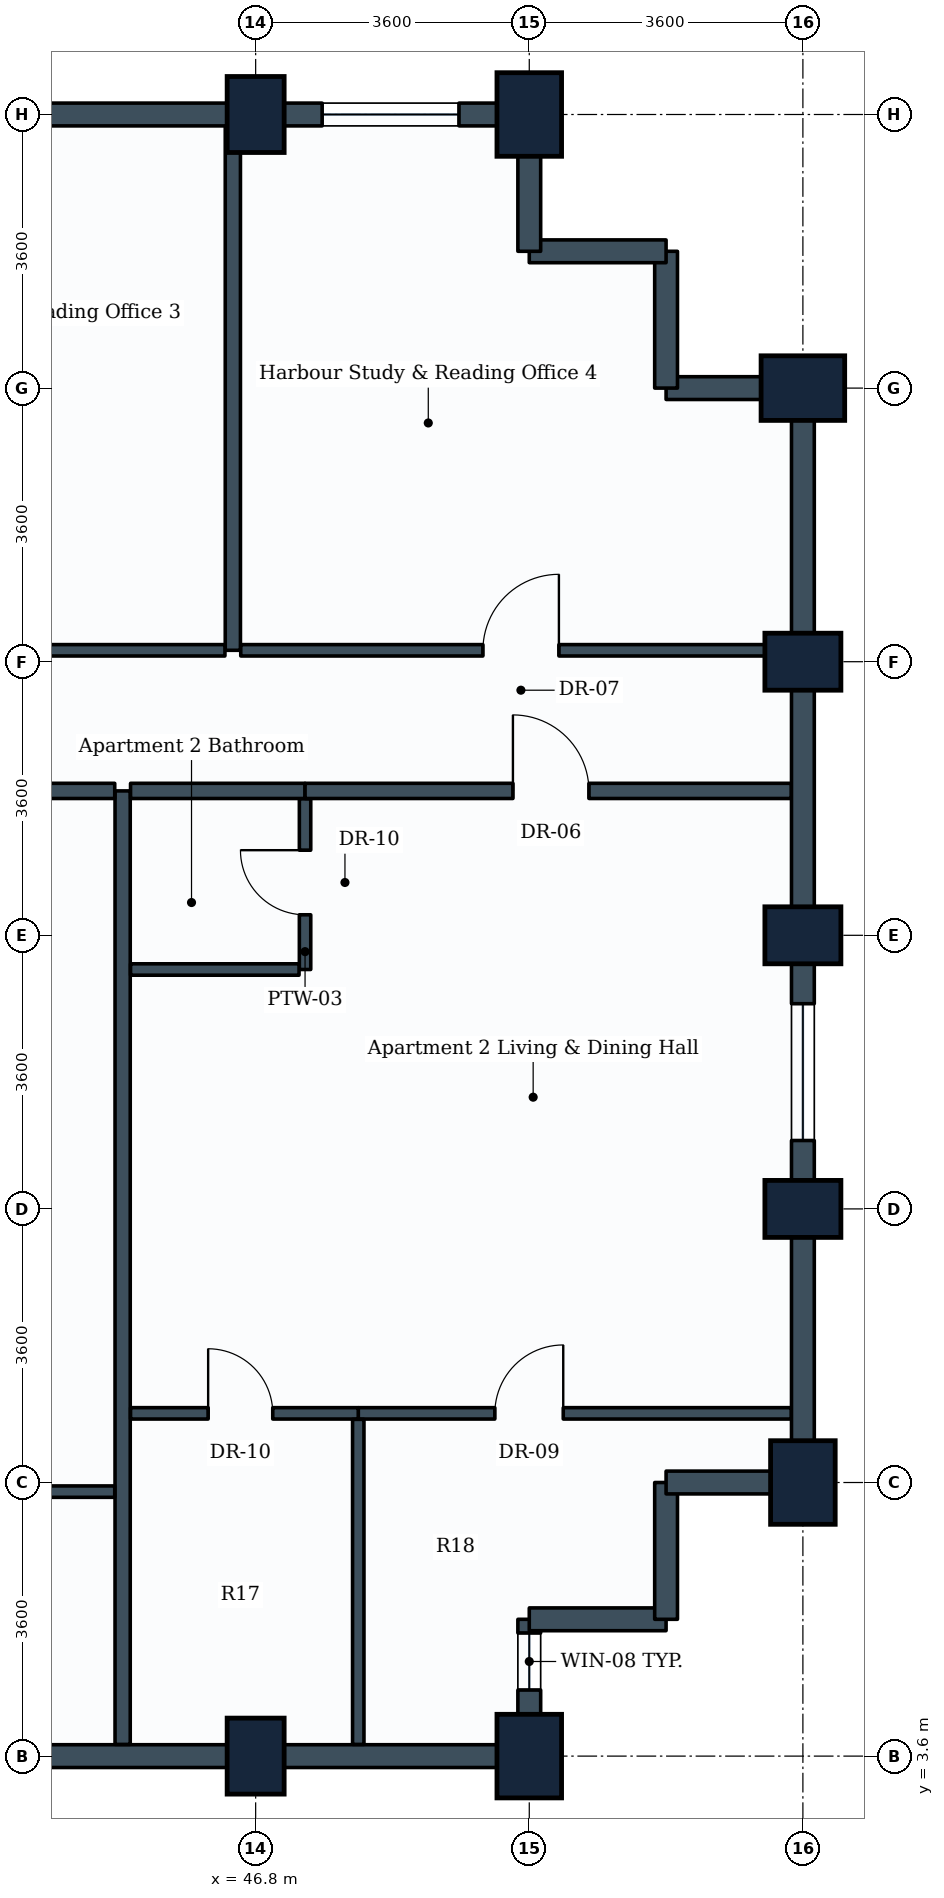
"""IFC4 building model, lengths in metres.
Left out: names, types, materials, properties, quantities, classifications, styles, units other than length and angle.
Written with IfcOpenShell. Run it as: python <this file> out.ifc"""

import sys

from ifc_helpers import new_model, si_unit, direction, frame, frame_2d, origin, origin_2d, place, context, subcontext, project, spatial, rectangle, extrude, element, fill, save


model = new_model("IFC4")
c1 = context("Model", 3, precision=1e-05, world=origin(), true_north=direction((0.0, 1.0)))
c2 = subcontext(c1, "Body", "Model", "MODEL_VIEW")
j1 = project(units=[si_unit("LENGTHUNIT", "METRE"), si_unit("PLANEANGLEUNIT", "RADIAN")], contexts=[c1])
p1 = place(None, origin())
s1 = spatial("IfcSite", under=j1, at=p1, CompositionType="ELEMENT")
p2 = place(p1, origin())
s2 = spatial("IfcBuilding", under=s1, at=p2, CompositionType="ELEMENT")
p3 = place(p2, frame((0.0, 0.0, 158.0)))
s3 = spatial("IfcBuildingStorey", under=s2, at=p3, CompositionType="ELEMENT", Elevation=158.0)
for number, where, z_axis, x_axis in (
    (1, (46.8, 3.6, 0.0), (0.0, 0.0, 1.0), (1.0, 0.0, 0.0)),
    (2, (46.8, 25.2, 0.0), (0.0, 0.0, 1.0), (1.0, 0.0, 0.0)),
):
    element("IfcColumn", number, at=place(p3, frame(where, z_axis=z_axis, x_axis=x_axis)), inside=s3, PredefinedType="COLUMN", context=c2, shape_type="SweptSolid", body=[
        extrude(rectangle(XDim=0.75, YDim=1.0, at=origin_2d()), origin(), (0.0, 0.0, 1.0), 3.8),
    ])
for number, where, z_axis, x_axis in (
    (3, (50.4, 3.6, 0.0), (0.0, 0.0, 1.0), (1.0, 0.0, 0.0)),
    (4, (50.4, 25.2, 0.0), (0.0, 0.0, 1.0), (1.0, 0.0, 0.0)),
    (5, (54.0, 7.2, 0.0), (0.0, 0.0, 1.0), (1.0, 0.0, 0.0)),
):
    element("IfcColumn", number, at=place(p3, frame(where, z_axis=z_axis, x_axis=x_axis)), inside=s3, PredefinedType="COLUMN", context=c2, shape_type="SweptSolid", body=[
        extrude(rectangle(XDim=0.85, YDim=1.1, at=origin_2d()), origin(), (0.0, 0.0, 1.0), 3.8),
    ])
for number, where, z_axis, x_axis in (
    (6, (54.0, 10.8, 0.0), (0.0, 0.0, 1.0), (0.0, 1.0, 0.0)),
    (7, (54.0, 14.4, 0.0), (0.0, 0.0, 1.0), (0.0, 1.0, 0.0)),
    (8, (54.0, 18.0, 0.0), (0.0, 0.0, 1.0), (0.0, 1.0, 0.0)),
):
    element("IfcColumn", number, at=place(p3, frame(where, z_axis=z_axis, x_axis=x_axis)), inside=s3, PredefinedType="COLUMN", context=c2, shape_type="SweptSolid", body=[
        extrude(rectangle(XDim=0.75, YDim=1.0, at=origin_2d()), origin(), (0.0, 0.0, 1.0), 3.8),
    ])
p4 = place(p3, frame((54.0, 21.6, 0.0), z_axis=(0.0, 0.0, 1.0), x_axis=(0.0, 1.0, 0.0)))
e9 = element("IfcColumn", 9, at=p4, inside=s3, PredefinedType="COLUMN", context=c2, shape_type="SweptSolid", body=[
    extrude(rectangle(XDim=0.85, YDim=1.1, at=origin_2d()), origin(), (0.0, 0.0, 1.0), 3.8),
])
p5 = place(p3, frame((46.8, 3.6, 0.0), z_axis=(0.0, 0.0, 1.0), x_axis=(-1.0, 0.0, 0.0)))
e10 = element("IfcWall", 10, at=p5, inside=s3, PredefinedType="STANDARD", context=c2, shape_type="SweptSolid", body=[
    extrude(rectangle(XDim=3.6, YDim=0.3, at=frame_2d((1.8, 0.0))), origin(), (0.0, 0.0, 1.0), 2.93),
])
p6 = place(p3, frame((50.4, 3.6, 0.0), z_axis=(0.0, 0.0, 1.0), x_axis=(-1.0, 0.0, 0.0)))
e11 = element("IfcWall", 11, at=p6, inside=s3, PredefinedType="STANDARD", context=c2, shape_type="SweptSolid", body=[
    extrude(rectangle(XDim=3.6, YDim=0.3, at=frame_2d((1.8, 0.0))), origin(), (0.0, 0.0, 1.0), 2.93),
])
p7 = place(p3, frame((50.4, 5.4, 0.0), z_axis=(0.0, 0.0, 1.0), x_axis=(0.0, -1.0, 0.0)))
e12 = element("IfcWall", 12, at=p7, inside=s3, PredefinedType="STANDARD", context=c2, shape_type="SweptSolid", body=[
    extrude(rectangle(XDim=1.8, YDim=0.3, at=frame_2d((0.9, 0.0))), origin(), (0.0, 0.0, 1.0), 2.93),
])
p8 = place(p7, frame((0.18, 0.0, 0.85)))
e13 = element("IfcOpeningElement", 13, at=p8, cuts=e12, PredefinedType="OPENING", context=c2, shape_type="SweptSolid", body=[
    extrude(rectangle(XDim=0.75, YDim=1.05, at=frame_2d((0.375, 0.525))), frame((0.0, 0.16, 0.0), z_axis=(0.0, -1.0, 0.0), x_axis=(1.0, 0.0, 0.0)), (0.0, 0.0, 1.0), 0.32),
])
for number, where, z_axis, x_axis in (
    (14, (52.2, 5.4, 0.0), (0.0, 0.0, 1.0), (-1.0, 0.0, 0.0)),
    (15, (52.2, 7.2, 0.0), (0.0, 0.0, 1.0), (0.0, -1.0, 0.0)),
):
    element("IfcWall", number, at=place(p3, frame(where, z_axis=z_axis, x_axis=x_axis)), inside=s3, PredefinedType="STANDARD", context=c2, shape_type="SweptSolid", body=[
        extrude(rectangle(XDim=1.8, YDim=0.3, at=frame_2d((0.9, 0.0))), origin(), (0.0, 0.0, 1.0), 3.535),
    ])
p9 = place(p3, frame((54.0, 7.2, 0.0), z_axis=(0.0, 0.0, 1.0), x_axis=(-1.0, 0.0, 0.0)))
e16 = element("IfcWall", 16, at=p9, inside=s3, PredefinedType="STANDARD", context=c2, shape_type="SweptSolid", body=[
    extrude(rectangle(XDim=1.8, YDim=0.3, at=frame_2d((0.9, 0.0))), origin(), (0.0, 0.0, 1.0), 2.93),
])
p10 = place(p3, frame((54.0, 10.8, 0.0), z_axis=(0.0, 0.0, 1.0), x_axis=(0.0, -1.0, 0.0)))
e17 = element("IfcWall", 17, at=p10, inside=s3, PredefinedType="STANDARD", context=c2, shape_type="SweptSolid", body=[
    extrude(rectangle(XDim=3.6, YDim=0.3, at=frame_2d((1.8, 0.0))), origin(), (0.0, 0.0, 1.0), 2.93),
])
p11 = place(p3, frame((54.0, 14.4, 0.0), z_axis=(0.0, 0.0, 1.0), x_axis=(0.0, -1.0, 0.0)))
e18 = element("IfcWall", 18, at=p11, inside=s3, PredefinedType="STANDARD", context=c2, shape_type="SweptSolid", body=[
    extrude(rectangle(XDim=3.6, YDim=0.3, at=frame_2d((1.8, 0.0))), origin(), (0.0, 0.0, 1.0), 2.93),
])
p12 = place(p11, frame((0.9, 0.0, 0.85)))
e19 = element("IfcOpeningElement", 19, at=p12, cuts=e18, PredefinedType="OPENING", context=c2, shape_type="SweptSolid", body=[
    extrude(rectangle(XDim=1.8, YDim=1.35, at=frame_2d((0.9, 0.675))), frame((0.0, 0.16, 0.0), z_axis=(0.0, -1.0, 0.0), x_axis=(1.0, 0.0, 0.0)), (0.0, 0.0, 1.0), 0.32),
])
for number, where, z_axis, x_axis in (
    (20, (54.0, 18.0, 0.0), (0.0, 0.0, 1.0), (0.0, -1.0, 0.0)),
    (21, (54.0, 21.6, 0.0), (0.0, 0.0, 1.0), (0.0, -1.0, 0.0)),
):
    element("IfcWall", number, at=place(p3, frame(where, z_axis=z_axis, x_axis=x_axis)), inside=s3, PredefinedType="STANDARD", context=c2, shape_type="SweptSolid", body=[
        extrude(rectangle(XDim=3.6, YDim=0.3, at=frame_2d((1.8, 0.0))), origin(), (0.0, 0.0, 1.0), 2.93),
    ])
p13 = place(p3, frame((52.2, 21.6, 0.0), z_axis=(0.0, 0.0, 1.0), x_axis=(1.0, 0.0, 0.0)))
e22 = element("IfcWall", 22, at=p13, inside=s3, PredefinedType="STANDARD", context=c2, shape_type="SweptSolid", body=[
    extrude(rectangle(XDim=1.8, YDim=0.3, at=frame_2d((0.9, 0.0))), origin(), (0.0, 0.0, 1.0), 2.93),
])
p14 = place(p3, frame((52.2, 23.4, 0.0), z_axis=(0.0, 0.0, 1.0), x_axis=(0.0, -1.0, 0.0)))
e23 = element("IfcWall", 23, at=p14, inside=s3, PredefinedType="STANDARD", context=c2, shape_type="SweptSolid", body=[
    extrude(rectangle(XDim=1.8, YDim=0.3, at=frame_2d((0.9, 0.0))), origin(), (0.0, 0.0, 1.0), 3.535),
])
p15 = place(p3, frame((50.4, 23.4, 0.0), z_axis=(0.0, 0.0, 1.0), x_axis=(1.0, 0.0, 0.0)))
e24 = element("IfcWall", 24, at=p15, inside=s3, PredefinedType="STANDARD", context=c2, shape_type="SweptSolid", body=[
    extrude(rectangle(XDim=1.8, YDim=0.3, at=frame_2d((0.9, 0.0))), origin(), (0.0, 0.0, 1.0), 3.535),
])
p16 = place(p3, frame((50.4, 25.2, 0.0), z_axis=(0.0, 0.0, 1.0), x_axis=(0.0, -1.0, 0.0)))
e25 = element("IfcWall", 25, at=p16, inside=s3, PredefinedType="STANDARD", context=c2, shape_type="SweptSolid", body=[
    extrude(rectangle(XDim=1.8, YDim=0.3, at=frame_2d((0.9, 0.0))), origin(), (0.0, 0.0, 1.0), 2.93),
])
p17 = place(p3, frame((46.8, 25.2, 0.0), z_axis=(0.0, 0.0, 1.0), x_axis=(1.0, 0.0, 0.0)))
e26 = element("IfcWall", 26, at=p17, inside=s3, PredefinedType="STANDARD", context=c2, shape_type="SweptSolid", body=[
    extrude(rectangle(XDim=3.6, YDim=0.3, at=frame_2d((1.8, 0.0))), origin(), (0.0, 0.0, 1.0), 2.93),
])
p18 = place(p17, frame((0.875, 0.0, 0.85)))
e27 = element("IfcOpeningElement", 27, at=p18, cuts=e26, PredefinedType="OPENING", context=c2, shape_type="SweptSolid", body=[
    extrude(rectangle(XDim=1.8, YDim=1.35, at=frame_2d((0.9, 0.675))), frame((0.0, 0.16, 0.0), z_axis=(0.0, -1.0, 0.0), x_axis=(1.0, 0.0, 0.0)), (0.0, 0.0, 1.0), 0.32),
])
p19 = place(p3, frame((43.2, 25.2, 0.0), z_axis=(0.0, 0.0, 1.0), x_axis=(1.0, 0.0, 0.0)))
e28 = element("IfcWall", 28, at=p19, inside=s3, PredefinedType="STANDARD", context=c2, shape_type="SweptSolid", body=[
    extrude(rectangle(XDim=3.6, YDim=0.3, at=frame_2d((1.8, 0.0))), origin(), (0.0, 0.0, 1.0), 2.93),
])
p20 = place(p3, frame((45.05, 3.754, 0.0), z_axis=(0.0, 0.0, 1.0), x_axis=(0.0, 1.0, 0.0)))
e29 = element("IfcWall", 29, at=p20, inside=s3, PredefinedType="PARTITIONING", context=c2, shape_type="SweptSolid", body=[
    extrude(rectangle(XDim=12.546, YDim=0.2, at=frame_2d((6.273, 0.0))), origin(), (0.0, 0.0, 1.0), 2.93),
])
p21 = place(p3, frame((36.8, 16.3, 0.0), z_axis=(0.0, 0.0, 1.0), x_axis=(1.0, 0.0, 0.0)))
e30 = element("IfcWall", 30, at=p21, inside=s3, PredefinedType="PARTITIONING", context=c2, shape_type="SweptSolid", body=[
    extrude(rectangle(XDim=8.146, YDim=0.2, at=frame_2d((4.073, 0.0))), origin(), (0.0, 0.0, 1.0), 3.17),
])
p22 = place(p21, frame((2.829, 0.0, 0.0)))
e31 = element("IfcOpeningElement", 31, at=p22, cuts=e30, PredefinedType="OPENING", context=c2, shape_type="SweptSolid", body=[
    extrude(rectangle(XDim=1.0, YDim=2.1, at=frame_2d((0.5, 1.05))), frame((0.0, 0.11, 0.0), z_axis=(0.0, -1.0, 0.0), x_axis=(1.0, 0.0, 0.0)), (0.0, 0.0, 1.0), 0.22),
])
p23 = place(p3, frame((37.5, 7.08, 0.0), z_axis=(0.0, 0.0, 1.0), x_axis=(1.0, 0.0, 0.0)))
e32 = element("IfcWall", 32, at=p23, inside=s3, PredefinedType="PARTITIONING", context=c2, shape_type="SweptSolid", body=[
    extrude(rectangle(XDim=7.446, YDim=0.15, at=frame_2d((3.723, 0.0))), origin(), (0.0, 0.0, 1.0), 3.17),
])
p24 = place(p23, frame((3.285, 0.0, 0.0)))
e33 = element("IfcOpeningElement", 33, at=p24, cuts=e32, PredefinedType="OPENING", context=c2, shape_type="SweptSolid", body=[
    extrude(rectangle(XDim=0.9, YDim=2.1, at=frame_2d((0.45, 1.05))), frame((0.0, 0.085, 0.0), z_axis=(0.0, -1.0, 0.0), x_axis=(1.0, 0.0, 0.0)), (0.0, 0.0, 1.0), 0.17),
])
p25 = place(p3, frame((45.154, 16.3, 0.0), z_axis=(0.0, 0.0, 1.0), x_axis=(1.0, 0.0, 0.0)))
e34 = element("IfcWall", 34, at=p25, inside=s3, PredefinedType="PARTITIONING", context=c2, shape_type="SweptSolid", body=[
    extrude(rectangle(XDim=2.296, YDim=0.2, at=frame_2d((1.148, 0.0))), origin(), (0.0, 0.0, 1.0), 3.17),
])
p26 = place(p3, frame((47.45, 13.95, 0.0), z_axis=(0.0, 0.0, 1.0), x_axis=(0.0, 1.0, 0.0)))
e35 = element("IfcWall", 35, at=p26, inside=s3, PredefinedType="PARTITIONING", context=c2, shape_type="SweptSolid", body=[
    extrude(rectangle(XDim=2.246, YDim=0.15, at=frame_2d((1.123, 0.0))), origin(), (0.0, 0.0, 1.0), 3.17),
])
p27 = place(p26, frame((0.72, 0.0, 0.0)))
e36 = element("IfcOpeningElement", 36, at=p27, cuts=e35, PredefinedType="OPENING", context=c2, shape_type="SweptSolid", body=[
    extrude(rectangle(XDim=0.85, YDim=2.1, at=frame_2d((0.425, 1.05))), frame((0.0, 0.085, 0.0), z_axis=(0.0, -1.0, 0.0), x_axis=(1.0, 0.0, 0.0)), (0.0, 0.0, 1.0), 0.17),
])
p28 = place(p3, frame((45.154, 13.95, 0.0), z_axis=(0.0, 0.0, 1.0), x_axis=(1.0, 0.0, 0.0)))
e37 = element("IfcWall", 37, at=p28, inside=s3, PredefinedType="PARTITIONING", context=c2, shape_type="SweptSolid", body=[
    extrude(rectangle(XDim=2.217, YDim=0.15, at=frame_2d((1.108, 0.0))), origin(), (0.0, 0.0, 1.0), 3.17),
])
p29 = place(p3, frame((47.45, 16.3, 0.0), z_axis=(0.0, 0.0, 1.0), x_axis=(1.0, 0.0, 0.0)))
e38 = element("IfcWall", 38, at=p29, inside=s3, PredefinedType="PARTITIONING", context=c2, shape_type="SweptSolid", body=[
    extrude(rectangle(XDim=6.396, YDim=0.2, at=frame_2d((3.198, 0.0))), origin(), (0.0, 0.0, 1.0), 2.93),
])
p30 = place(p29, frame((2.735, 0.0, 0.0)))
e39 = element("IfcOpeningElement", 39, at=p30, cuts=e38, PredefinedType="OPENING", context=c2, shape_type="SweptSolid", body=[
    extrude(rectangle(XDim=1.0, YDim=2.1, at=frame_2d((0.5, 1.05))), frame((0.0, 0.11, 0.0), z_axis=(0.0, -1.0, 0.0), x_axis=(1.0, 0.0, 0.0)), (0.0, 0.0, 1.0), 0.22),
])
p31 = place(p3, frame((48.15, 8.11, 0.0), z_axis=(0.0, 0.0, 1.0), x_axis=(1.0, 0.0, 0.0)))
e40 = element("IfcWall", 40, at=p31, inside=s3, PredefinedType="PARTITIONING", context=c2, shape_type="SweptSolid", body=[
    extrude(rectangle(XDim=5.696, YDim=0.15, at=frame_2d((2.848, 0.0))), origin(), (0.0, 0.0, 1.0), 2.93),
])
p32 = place(p31, frame((1.797, 0.0, 0.0)))
e41 = element("IfcOpeningElement", 41, at=p32, cuts=e40, PredefinedType="OPENING", context=c2, shape_type="SweptSolid", body=[
    extrude(rectangle(XDim=0.9, YDim=2.1, at=frame_2d((0.45, 1.05))), frame((0.0, 0.085, 0.0), z_axis=(0.0, -1.0, 0.0), x_axis=(1.0, 0.0, 0.0)), (0.0, 0.0, 1.0), 0.17),
])
p33 = place(p3, frame((45.154, 8.11, 0.0), z_axis=(0.0, 0.0, 1.0), x_axis=(1.0, 0.0, 0.0)))
e42 = element("IfcWall", 42, at=p33, inside=s3, PredefinedType="PARTITIONING", context=c2, shape_type="SweptSolid", body=[
    extrude(rectangle(XDim=2.996, YDim=0.15, at=frame_2d((1.498, 0.0))), origin(), (0.0, 0.0, 1.0), 3.17),
])
p34 = place(p33, frame((1.021, 0.0, 0.0)))
e43 = element("IfcOpeningElement", 43, at=p34, cuts=e42, PredefinedType="OPENING", context=c2, shape_type="SweptSolid", body=[
    extrude(rectangle(XDim=0.85, YDim=2.1, at=frame_2d((0.425, 1.05))), frame((0.0, 0.085, 0.0), z_axis=(0.0, -1.0, 0.0), x_axis=(1.0, 0.0, 0.0)), (0.0, 0.0, 1.0), 0.17),
])
p35 = place(p3, frame((48.15, 3.754, 0.0), z_axis=(0.0, 0.0, 1.0), x_axis=(0.0, 1.0, 0.0)))
e44 = element("IfcWall", 44, at=p35, inside=s3, PredefinedType="PARTITIONING", context=c2, shape_type="SweptSolid", body=[
    extrude(rectangle(XDim=4.277, YDim=0.15, at=frame_2d((2.139, 0.0))), origin(), (0.0, 0.0, 1.0), 2.93),
])
p36 = place(p3, frame((46.5, 18.15, 0.0), z_axis=(0.0, 0.0, 1.0), x_axis=(0.0, 1.0, 0.0)))
e45 = element("IfcWall", 45, at=p36, inside=s3, PredefinedType="PARTITIONING", context=c2, shape_type="SweptSolid", body=[
    extrude(rectangle(XDim=6.896, YDim=0.2, at=frame_2d((3.448, 0.0))), origin(), (0.0, 0.0, 1.0), 2.93),
])
p37 = place(p3, frame((39.0, 18.15, 0.0), z_axis=(0.0, 0.0, 1.0), x_axis=(1.0, 0.0, 0.0)))
e46 = element("IfcWall", 46, at=p37, inside=s3, PredefinedType="PARTITIONING", context=c2, shape_type="SweptSolid", body=[
    extrude(rectangle(XDim=7.396, YDim=0.15, at=frame_2d((3.698, 0.0))), origin(), (0.0, 0.0, 1.0), 3.17),
])
p38 = place(p37, frame((3.29, 0.0, 0.0)))
e47 = element("IfcOpeningElement", 47, at=p38, cuts=e46, PredefinedType="OPENING", context=c2, shape_type="SweptSolid", body=[
    extrude(rectangle(XDim=1.0, YDim=2.1, at=frame_2d((0.5, 1.05))), frame((0.0, 0.085, 0.0), z_axis=(0.0, -1.0, 0.0), x_axis=(1.0, 0.0, 0.0)), (0.0, 0.0, 1.0), 0.17),
])
p39 = place(p3, frame((46.604, 18.15, 0.0), z_axis=(0.0, 0.0, 1.0), x_axis=(1.0, 0.0, 0.0)))
e48 = element("IfcWall", 48, at=p39, inside=s3, PredefinedType="PARTITIONING", context=c2, shape_type="SweptSolid", body=[
    extrude(rectangle(XDim=7.242, YDim=0.15, at=frame_2d((3.621, 0.0))), origin(), (0.0, 0.0, 1.0), 2.93),
])
p40 = place(p39, frame((3.186, 0.0, 0.0)))
e49 = element("IfcOpeningElement", 49, at=p40, cuts=e48, PredefinedType="OPENING", context=c2, shape_type="SweptSolid", body=[
    extrude(rectangle(XDim=1.0, YDim=2.1, at=frame_2d((0.5, 1.05))), frame((0.0, 0.085, 0.0), z_axis=(0.0, -1.0, 0.0), x_axis=(1.0, 0.0, 0.0)), (0.0, 0.0, 1.0), 0.17),
])
p41 = place(p12, origin())
e50 = element("IfcWindow", 50, at=p41, inside=s3, PartitioningType="SINGLE_PANEL", PredefinedType="WINDOW", context=c2, shape_type="SweptSolid", body=[
    extrude(rectangle(XDim=1.8, YDim=1.35, at=frame_2d((0.9, 0.675))), frame((0.0, 0.03, 0.0), z_axis=(0.0, -1.0, 0.0), x_axis=(1.0, 0.0, 0.0)), (0.0, 0.0, 1.0), 0.06),
])
fill(e19, e50)
p42 = place(p18, origin())
e51 = element("IfcWindow", 51, at=p42, inside=s3, PartitioningType="SINGLE_PANEL", PredefinedType="WINDOW", context=c2, shape_type="SweptSolid", body=[
    extrude(rectangle(XDim=1.8, YDim=1.35, at=frame_2d((0.9, 0.675))), frame((0.0, 0.03, 0.0), z_axis=(0.0, -1.0, 0.0), x_axis=(1.0, 0.0, 0.0)), (0.0, 0.0, 1.0), 0.06),
])
fill(e27, e51)
p43 = place(p27, origin())
e52 = element("IfcDoor", 52, at=p43, inside=s3, OperationType="SINGLE_SWING_RIGHT", PredefinedType="DOOR", context=c2, shape_type="SweptSolid", body=[
    extrude(rectangle(XDim=0.85, YDim=2.1, at=frame_2d((0.425, 1.05))), frame((0.0, 0.025, 0.0), z_axis=(0.0, -1.0, 0.0), x_axis=(1.0, 0.0, 0.0)), (0.0, 0.0, 1.0), 0.05),
])
fill(e36, e52)
p44 = place(p30, origin())
e53 = element("IfcDoor", 53, at=p44, inside=s3, OperationType="SINGLE_SWING_LEFT", PredefinedType="DOOR", context=c2, shape_type="SweptSolid", body=[
    extrude(rectangle(XDim=1.0, YDim=2.1, at=frame_2d((0.5, 1.05))), frame((0.0, 0.025, 0.0), z_axis=(0.0, -1.0, 0.0), x_axis=(1.0, 0.0, 0.0)), (0.0, 0.0, 1.0), 0.05),
])
fill(e39, e53)
p45 = place(p32, origin())
e54 = element("IfcDoor", 54, at=p45, inside=s3, OperationType="SINGLE_SWING_RIGHT", PredefinedType="DOOR", context=c2, shape_type="SweptSolid", body=[
    extrude(rectangle(XDim=0.9, YDim=2.1, at=frame_2d((0.45, 1.05))), frame((0.0, 0.025, 0.0), z_axis=(0.0, -1.0, 0.0), x_axis=(1.0, 0.0, 0.0)), (0.0, 0.0, 1.0), 0.05),
])
fill(e41, e54)
p46 = place(p34, origin())
e55 = element("IfcDoor", 55, at=p46, inside=s3, OperationType="SINGLE_SWING_LEFT", PredefinedType="DOOR", context=c2, shape_type="SweptSolid", body=[
    extrude(rectangle(XDim=0.85, YDim=2.1, at=frame_2d((0.425, 1.05))), frame((0.0, 0.025, 0.0), z_axis=(0.0, -1.0, 0.0), x_axis=(1.0, 0.0, 0.0)), (0.0, 0.0, 1.0), 0.05),
])
fill(e43, e55)
p47 = place(p40, origin())
e56 = element("IfcDoor", 56, at=p47, inside=s3, OperationType="SINGLE_SWING_RIGHT", PredefinedType="DOOR", context=c2, shape_type="SweptSolid", body=[
    extrude(rectangle(XDim=1.0, YDim=2.1, at=frame_2d((0.5, 1.05))), frame((0.0, 0.025, 0.0), z_axis=(0.0, -1.0, 0.0), x_axis=(1.0, 0.0, 0.0)), (0.0, 0.0, 1.0), 0.05),
])
fill(e49, e56)
p48 = place(p8, origin())
e57 = element("IfcWindow", 57, at=p48, inside=s3, PartitioningType="SINGLE_PANEL", PredefinedType="WINDOW", context=c2, shape_type="SweptSolid", body=[
    extrude(rectangle(XDim=0.75, YDim=1.05, at=frame_2d((0.375, 0.525))), frame((0.0, 0.03, 0.0), z_axis=(0.0, -1.0, 0.0), x_axis=(1.0, 0.0, 0.0)), (0.0, 0.0, 1.0), 0.06),
])
fill(e13, e57)
save(model, sys.argv[1])
